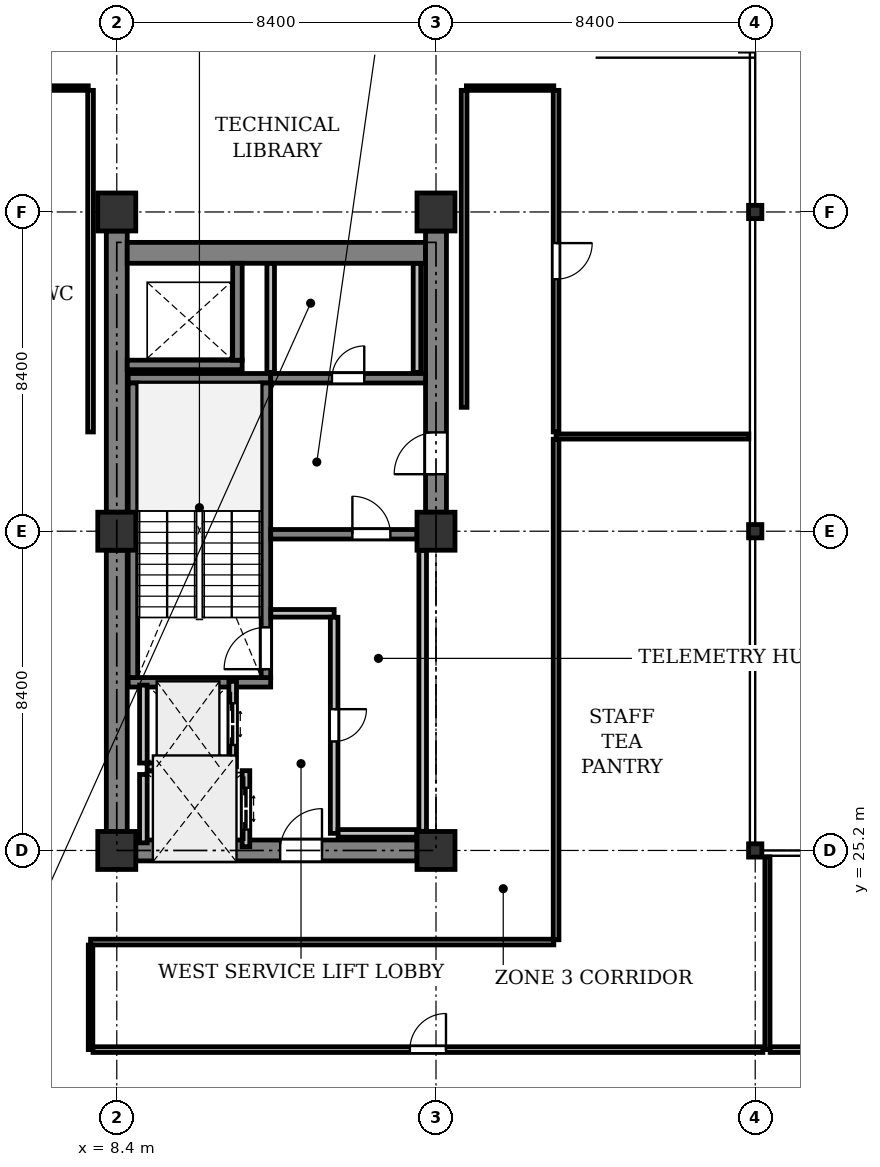
"""IFC4 building model, lengths in metres.
Left out: names, types, materials, properties, quantities, classifications, styles, units other than length and angle.
Written with IfcOpenShell. Run it as: python <this file> out.ifc"""

import sys

from ifc_helpers import new_model, si_unit, direction, frame, frame_2d, origin, origin_2d, place, context, subcontext, project, spatial, rectangle, i_section, extrude, element, fill, save


model = new_model("IFC4")
c1 = context("Model", 3, precision=1e-05, world=origin(), true_north=direction((0.0, 1.0)))
c2 = subcontext(c1, "Body", "Model", "MODEL_VIEW")
j1 = project(units=[si_unit("LENGTHUNIT", "METRE"), si_unit("PLANEANGLEUNIT", "RADIAN")], contexts=[c1])
p1 = place(None, origin())
s1 = spatial("IfcSite", under=j1, at=p1, CompositionType="ELEMENT")
p2 = place(p1, origin())
s2 = spatial("IfcBuilding", under=s1, at=p2, CompositionType="ELEMENT")
p3 = place(p2, frame((0.0, 0.0, 196.0)))
s3 = spatial("IfcBuildingStorey", under=s2, at=p3, CompositionType="ELEMENT", Elevation=196.0)
for number, where, z_axis, x_axis in (
    (1, (8.4, 25.2, 0.0), (0.0, 0.0, 1.0), (1.0, 0.0, 0.0)),
    (2, (8.4, 33.6, 0.0), (0.0, 0.0, 1.0), (1.0, 0.0, 0.0)),
    (3, (8.4, 42.0, 0.0), (0.0, 0.0, 1.0), (1.0, 0.0, 0.0)),
    (4, (16.8, 25.2, 0.0), (0.0, 0.0, 1.0), (1.0, 0.0, 0.0)),
    (5, (16.8, 33.6, 0.0), (0.0, 0.0, 1.0), (1.0, 0.0, 0.0)),
    (6, (16.8, 42.0, 0.0), (0.0, 0.0, 1.0), (1.0, 0.0, 0.0)),
):
    element("IfcColumn", number, at=place(p3, frame(where, z_axis=z_axis, x_axis=x_axis)), inside=s3, PredefinedType="COLUMN", context=c2, shape_type="SweptSolid", body=[
        extrude(rectangle(XDim=1.0, YDim=1.0, at=origin_2d()), origin(), (0.0, 0.0, 1.0), 4.1),
    ])
for number, where, z_axis, x_axis in (
    (7, (25.2, 25.2, 0.0), (0.0, 0.0, 1.0), (1.0, 0.0, 0.0)),
    (8, (25.2, 33.6, 0.0), (0.0, 0.0, 1.0), (1.0, 0.0, 0.0)),
    (9, (25.2, 42.0, 0.0), (0.0, 0.0, 1.0), (1.0, 0.0, 0.0)),
):
    element("IfcColumn", number, at=place(p3, frame(where, z_axis=z_axis, x_axis=x_axis)), inside=s3, PredefinedType="COLUMN", context=c2, shape_type="SweptSolid", body=[
        extrude(i_section(OverallWidth=0.35, OverallDepth=0.35, WebThickness=0.02, FlangeThickness=0.032, at=origin_2d()), origin(), (0.0, 0.0, 1.0), 4.1),
    ])
p4 = place(p3, frame((8.4, 25.7, 0.0), z_axis=(0.0, 0.0, 1.0), x_axis=(0.0, 1.0, 0.0)))
e10 = element("IfcWall", 10, at=p4, inside=s3, PredefinedType="SHEAR", context=c2, shape_type="SweptSolid", body=[
    extrude(rectangle(XDim=7.4, YDim=0.55, at=frame_2d((3.7, 0.0))), origin(), (0.0, 0.0, 1.0), 3.825),
])
p5 = place(p3, frame((8.4, 34.1, 0.0), z_axis=(0.0, 0.0, 1.0), x_axis=(0.0, 1.0, 0.0)))
e11 = element("IfcWall", 11, at=p5, inside=s3, PredefinedType="SHEAR", context=c2, shape_type="SweptSolid", body=[
    extrude(rectangle(XDim=7.4, YDim=0.55, at=frame_2d((3.7, 0.0))), origin(), (0.0, 0.0, 1.0), 3.825),
])
p6 = place(p3, frame((8.675, 40.925, 0.0), z_axis=(0.0, 0.0, 1.0), x_axis=(1.0, 0.0, 0.0)))
e12 = element("IfcWall", 12, at=p6, inside=s3, PredefinedType="SHEAR", context=c2, shape_type="SweptSolid", body=[
    extrude(rectangle(XDim=7.85, YDim=0.55, at=frame_2d((3.925, 0.0))), origin(), (0.0, 0.0, 1.0), 3.825),
])
p7 = place(p3, frame((16.8, 34.1, 0.0), z_axis=(0.0, 0.0, 1.0), x_axis=(0.0, 1.0, 0.0)))
e13 = element("IfcWall", 13, at=p7, inside=s3, PredefinedType="SHEAR", context=c2, shape_type="SweptSolid", body=[
    extrude(rectangle(XDim=7.4, YDim=0.55, at=frame_2d((3.7, 0.0))), origin(), (0.0, 0.0, 1.0), 3.825),
])
p8 = place(p7, frame((1.0, 0.0, 0.0)))
e14 = element("IfcOpeningElement", 14, at=p8, cuts=e13, PredefinedType="OPENING", context=c2, shape_type="SweptSolid", body=[
    extrude(rectangle(XDim=1.1, YDim=2.15, at=frame_2d((0.55, 1.075))), frame((0.0, 0.285, 0.0), z_axis=(0.0, -1.0, 0.0), x_axis=(1.0, 0.0, 0.0)), (0.0, 0.0, 1.0), 0.57),
])
p9 = place(p3, frame((8.9, 25.2, 0.0), z_axis=(0.0, 0.0, 1.0), x_axis=(1.0, 0.0, 0.0)))
e15 = element("IfcWall", 15, at=p9, inside=s3, PredefinedType="SHEAR", context=c2, shape_type="SweptSolid", body=[
    extrude(rectangle(XDim=7.4, YDim=0.55, at=frame_2d((3.7, 0.0))), origin(), (0.0, 0.0, 1.0), 3.825),
])
p10 = place(p9, frame((3.8, 0.0, 0.0)))
e16 = element("IfcOpeningElement", 16, at=p10, cuts=e15, PredefinedType="OPENING", context=c2, shape_type="SweptSolid", body=[
    extrude(rectangle(XDim=1.1, YDim=2.15, at=frame_2d((0.55, 1.075))), frame((0.0, 0.285, 0.0), z_axis=(0.0, -1.0, 0.0), x_axis=(1.0, 0.0, 0.0)), (0.0, 0.0, 1.0), 0.57),
])
for number, where, z_axis, x_axis in (
    (17, (12.45, 29.625, 0.0), (0.0, 0.0, 1.0), (-1.0, 0.0, 0.0)),
    (18, (12.45, 37.625, 0.0), (0.0, 0.0, 1.0), (-1.0, 0.0, 0.0)),
):
    element("IfcWall", number, at=place(p3, frame(where, z_axis=z_axis, x_axis=x_axis)), inside=s3, PredefinedType="SHEAR", context=c2, shape_type="SweptSolid", body=[
        extrude(rectangle(XDim=3.75, YDim=0.25, at=frame_2d((1.875, 0.0))), origin(), (0.0, 0.0, 1.0), 3.825),
    ])
p11 = place(p3, frame((12.325, 29.75, 0.0), z_axis=(0.0, 0.0, 1.0), x_axis=(0.0, 1.0, 0.0)))
e19 = element("IfcWall", 19, at=p11, inside=s3, PredefinedType="SHEAR", context=c2, shape_type="SweptSolid", body=[
    extrude(rectangle(XDim=7.75, YDim=0.25, at=frame_2d((3.875, 0.0))), origin(), (0.0, 0.0, 1.0), 3.825),
])
p12 = place(p11, frame((0.22, 0.0, 0.0)))
e20 = element("IfcOpeningElement", 20, at=p12, cuts=e19, PredefinedType="OPENING", context=c2, shape_type="SweptSolid", body=[
    extrude(rectangle(XDim=1.1, YDim=2.15, at=frame_2d((0.55, 1.075))), frame((0.0, 0.135, 0.0), z_axis=(0.0, -1.0, 0.0), x_axis=(1.0, 0.0, 0.0)), (0.0, 0.0, 1.0), 0.27),
])
p13 = place(p3, frame((8.825, 29.75, 0.0), z_axis=(0.0, 0.0, 1.0), x_axis=(0.0, 1.0, 0.0)))
e21 = element("IfcWall", 21, at=p13, inside=s3, PredefinedType="SHEAR", context=c2, shape_type="SweptSolid", body=[
    extrude(rectangle(XDim=7.75, YDim=0.25, at=frame_2d((3.875, 0.0))), origin(), (0.0, 0.0, 1.0), 3.825),
])
p14 = place(p3, frame((8.675, 37.975, 0.0), z_axis=(0.0, 0.0, 1.0), x_axis=(1.0, 0.0, 0.0)))
e22 = element("IfcWall", 22, at=p14, inside=s3, PredefinedType="SHEAR", context=c2, shape_type="SweptSolid", body=[
    extrude(rectangle(XDim=3.025, YDim=0.25, at=frame_2d((1.512, 0.0))), origin(), (0.0, 0.0, 1.0), 3.825),
])
p15 = place(p3, frame((11.575, 38.1, 0.0), z_axis=(0.0, 0.0, 1.0), x_axis=(0.0, 1.0, 0.0)))
e23 = element("IfcWall", 23, at=p15, inside=s3, PredefinedType="SHEAR", context=c2, shape_type="SweptSolid", body=[
    extrude(rectangle(XDim=2.55, YDim=0.25, at=frame_2d((1.275, 0.0))), origin(), (0.0, 0.0, 1.0), 3.825),
])
p16 = place(p3, frame((12.45, 33.52, 0.0), z_axis=(0.0, 0.0, 1.0), x_axis=(1.0, 0.0, 0.0)))
e24 = element("IfcWall", 24, at=p16, inside=s3, PredefinedType="SHEAR", context=c2, shape_type="SweptSolid", body=[
    extrude(rectangle(XDim=3.85, YDim=0.25, at=frame_2d((1.925, 0.0))), origin(), (0.0, 0.0, 1.0), 3.825),
])
p17 = place(p16, frame((2.15, 0.0, 0.0)))
e25 = element("IfcOpeningElement", 25, at=p17, cuts=e24, PredefinedType="OPENING", context=c2, shape_type="SweptSolid", body=[
    extrude(rectangle(XDim=1.0, YDim=2.15, at=frame_2d((0.5, 1.075))), frame((0.0, 0.135, 0.0), z_axis=(0.0, -1.0, 0.0), x_axis=(1.0, 0.0, 0.0)), (0.0, 0.0, 1.0), 0.27),
])
p18 = place(p3, frame((12.45, 37.625, 0.0), z_axis=(0.0, 0.0, 1.0), x_axis=(1.0, 0.0, 0.0)))
e26 = element("IfcWall", 26, at=p18, inside=s3, PredefinedType="SHEAR", context=c2, shape_type="SweptSolid", body=[
    extrude(rectangle(XDim=4.075, YDim=0.25, at=frame_2d((2.038, 0.0))), origin(), (0.0, 0.0, 1.0), 3.825),
])
p19 = place(p18, frame((1.613, 0.0, 0.0)))
e27 = element("IfcOpeningElement", 27, at=p19, cuts=e26, PredefinedType="OPENING", context=c2, shape_type="SweptSolid", body=[
    extrude(rectangle(XDim=0.85, YDim=2.15, at=frame_2d((0.425, 1.075))), frame((0.0, 0.135, 0.0), z_axis=(0.0, -1.0, 0.0), x_axis=(1.0, 0.0, 0.0)), (0.0, 0.0, 1.0), 0.27),
])
p20 = place(p3, frame((11.45, 27.4, 0.0), z_axis=(0.0, 0.0, 1.0), x_axis=(0.0, 1.0, 0.0)))
e28 = element("IfcWall", 28, at=p20, inside=s3, PredefinedType="PARTITIONING", context=c2, shape_type="SweptSolid", body=[
    extrude(rectangle(XDim=2.25, YDim=0.2, at=frame_2d((1.125, 0.0))), origin(), (0.0, 0.0, 1.0), 3.825),
])
p21 = place(p20, frame((0.575, 0.0, 0.0)))
e29 = element("IfcOpeningElement", 29, at=p21, cuts=e28, PredefinedType="OPENING", context=c2, shape_type="SweptSolid", body=[
    extrude(rectangle(XDim=1.1, YDim=2.2, at=frame_2d((0.55, 1.1))), frame((0.0, 0.11, 0.0), z_axis=(0.0, -1.0, 0.0), x_axis=(1.0, 0.0, 0.0)), (0.0, 0.0, 1.0), 0.22),
])
p22 = place(p3, frame((9.1, 27.5, 0.0), z_axis=(0.0, 0.0, 1.0), x_axis=(0.0, 1.0, 0.0)))
e30 = element("IfcWall", 30, at=p22, inside=s3, PredefinedType="PARTITIONING", context=c2, shape_type="SweptSolid", body=[
    extrude(rectangle(XDim=2.05, YDim=0.2, at=frame_2d((1.025, 0.0))), origin(), (0.0, 0.0, 1.0), 3.825),
])
p23 = place(p3, frame((9.2, 27.4, 0.0), z_axis=(0.0, 0.0, 1.0), x_axis=(1.0, 0.0, 0.0)))
e31 = element("IfcWall", 31, at=p23, inside=s3, PredefinedType="PARTITIONING", context=c2, shape_type="SweptSolid", body=[
    extrude(rectangle(XDim=2.15, YDim=0.2, at=frame_2d((1.075, 0.0))), origin(), (0.0, 0.0, 1.0), 3.825),
])
p24 = place(p3, frame((11.8, 25.3, 0.0), z_axis=(0.0, 0.0, 1.0), x_axis=(0.0, 1.0, 0.0)))
e32 = element("IfcWall", 32, at=p24, inside=s3, PredefinedType="PARTITIONING", context=c2, shape_type="SweptSolid", body=[
    extrude(rectangle(XDim=2.0, YDim=0.2, at=frame_2d((1.0, 0.0))), origin(), (0.0, 0.0, 1.0), 3.825),
])
p25 = place(p24, frame((0.45, 0.0, 0.0)))
e33 = element("IfcOpeningElement", 33, at=p25, cuts=e32, PredefinedType="OPENING", context=c2, shape_type="SweptSolid", body=[
    extrude(rectangle(XDim=1.1, YDim=2.2, at=frame_2d((0.55, 1.1))), frame((0.0, 0.11, 0.0), z_axis=(0.0, -1.0, 0.0), x_axis=(1.0, 0.0, 0.0)), (0.0, 0.0, 1.0), 0.22),
])
p26 = place(p3, frame((9.1, 25.4, 0.0), z_axis=(0.0, 0.0, 1.0), x_axis=(0.0, 1.0, 0.0)))
e34 = element("IfcWall", 34, at=p26, inside=s3, PredefinedType="PARTITIONING", context=c2, shape_type="SweptSolid", body=[
    extrude(rectangle(XDim=1.8, YDim=0.2, at=frame_2d((0.9, 0.0))), origin(), (0.0, 0.0, 1.0), 3.825),
])
p27 = place(p3, frame((16.45, 25.705, 0.0), z_axis=(0.0, 0.0, 1.0), x_axis=(0.0, 1.0, 0.0)))
e35 = element("IfcWall", 35, at=p27, inside=s3, PredefinedType="PARTITIONING", context=c2, shape_type="SweptSolid", body=[
    extrude(rectangle(XDim=7.39, YDim=0.2, at=frame_2d((3.695, 0.0))), origin(), (0.0, 0.0, 1.0), 3.825),
])
p28 = place(p3, frame((12.454, 31.44, 0.0), z_axis=(0.0, 0.0, 1.0), x_axis=(1.0, 0.0, 0.0)))
e36 = element("IfcWall", 36, at=p28, inside=s3, PredefinedType="PARTITIONING", context=c2, shape_type="SweptSolid", body=[
    extrude(rectangle(XDim=1.666, YDim=0.2, at=frame_2d((0.833, 0.0))), origin(), (0.0, 0.0, 1.0), 3.825),
])
p29 = place(p3, frame((14.12, 31.336, 0.0), z_axis=(0.0, 0.0, 1.0), x_axis=(0.0, -1.0, 0.0)))
e37 = element("IfcWall", 37, at=p29, inside=s3, PredefinedType="PARTITIONING", context=c2, shape_type="SweptSolid", body=[
    extrude(rectangle(XDim=5.686, YDim=0.2, at=frame_2d((2.843, 0.0))), origin(), (0.0, 0.0, 1.0), 3.825),
])
p30 = place(p29, frame((2.418, 0.0, 0.0)))
e38 = element("IfcOpeningElement", 38, at=p30, cuts=e37, PredefinedType="OPENING", context=c2, shape_type="SweptSolid", body=[
    extrude(rectangle(XDim=0.85, YDim=2.15, at=frame_2d((0.425, 1.075))), frame((0.0, 0.11, 0.0), z_axis=(0.0, -1.0, 0.0), x_axis=(1.0, 0.0, 0.0)), (0.0, 0.0, 1.0), 0.22),
])
p31 = place(p3, frame((14.224, 25.65, 0.0), z_axis=(0.0, 0.0, 1.0), x_axis=(1.0, 0.0, 0.0)))
e39 = element("IfcWall", 39, at=p31, inside=s3, PredefinedType="PARTITIONING", context=c2, shape_type="SweptSolid", body=[
    extrude(rectangle(XDim=2.071, YDim=0.2, at=frame_2d((1.035, 0.0))), origin(), (0.0, 0.0, 1.0), 3.825),
])
for number, where, z_axis, x_axis in (
    (40, (16.3, 37.78, 0.0), (0.0, 0.0, 1.0), (0.0, 1.0, 0.0)),
    (41, (12.45, 40.646, 0.0), (0.0, 0.0, 1.0), (0.0, -1.0, 0.0)),
):
    element("IfcWall", number, at=place(p3, frame(where, z_axis=z_axis, x_axis=x_axis)), inside=s3, PredefinedType="PARTITIONING", context=c2, shape_type="SweptSolid", body=[
        extrude(rectangle(XDim=2.866, YDim=0.2, at=frame_2d((1.433, 0.0))), origin(), (0.0, 0.0, 1.0), 2.875),
    ])
p32 = place(p3, frame((25.521, 25.031, 0.0), z_axis=(0.0, 0.0, 1.0), x_axis=(0.0, -1.0, 0.0)))
e42 = element("IfcWall", 42, at=p32, inside=s3, PredefinedType="PARTITIONING", context=c2, shape_type="SweptSolid", body=[
    extrude(rectangle(XDim=5.071, YDim=0.135, at=frame_2d((2.536, 0.0))), origin(), (0.0, 0.0, 1.0), 3.825),
])
p33 = place(p3, frame((25.593, 19.96, 0.0), z_axis=(0.0, 0.0, 1.0), x_axis=(1.0, 0.0, 0.0)))
e43 = element("IfcWall", 43, at=p33, inside=s3, PredefinedType="PARTITIONING", context=c2, shape_type="SweptSolid", body=[
    extrude(rectangle(XDim=11.057, YDim=0.15, at=frame_2d((5.528, 0.0))), origin(), (0.0, 0.0, 1.0), 3.371),
])
p34 = place(p33, frame((5.053, 0.0, 0.0)))
e44 = element("IfcOpeningElement", 44, at=p34, cuts=e43, PredefinedType="OPENING", context=c2, shape_type="SweptSolid", body=[
    extrude(rectangle(XDim=0.95, YDim=2.15, at=frame_2d((0.475, 1.075))), frame((0.0, 0.085, 0.0), z_axis=(0.0, -1.0, 0.0), x_axis=(1.0, 0.0, 0.0)), (0.0, 0.0, 1.0), 0.17),
])
p35 = place(p3, frame((19.9, 22.79, 0.0), z_axis=(0.0, 0.0, 1.0), x_axis=(-1.0, 0.0, 0.0)))
e45 = element("IfcWall", 45, at=p35, inside=s3, PredefinedType="PARTITIONING", context=c2, shape_type="SweptSolid", body=[
    extrude(rectangle(XDim=12.19, YDim=0.15, at=frame_2d((6.095, 0.0))), origin(), (0.0, 0.0, 1.0), 3.371),
])
p36 = place(p3, frame((7.71, 22.711, 0.0), z_axis=(0.0, 0.0, 1.0), x_axis=(0.0, -1.0, 0.0)))
e46 = element("IfcWall", 46, at=p36, inside=s3, PredefinedType="PARTITIONING", context=c2, shape_type="SweptSolid", body=[
    extrude(rectangle(XDim=2.751, YDim=0.12, at=frame_2d((1.375, 0.0))), origin(), (0.0, 0.0, 1.0), 3.825),
])
p37 = place(p3, frame((7.774, 19.96, 0.0), z_axis=(0.0, 0.0, 1.0), x_axis=(1.0, 0.0, 0.0)))
e47 = element("IfcWall", 47, at=p37, inside=s3, PredefinedType="PARTITIONING", context=c2, shape_type="SweptSolid", body=[
    extrude(rectangle(XDim=17.628, YDim=0.15, at=frame_2d((8.814, 0.0))), origin(), (0.0, 0.0, 1.0), 3.371),
])
p38 = place(p37, frame((8.339, 0.0, 0.0)))
e48 = element("IfcOpeningElement", 48, at=p38, cuts=e47, PredefinedType="OPENING", context=c2, shape_type="SweptSolid", body=[
    extrude(rectangle(XDim=0.95, YDim=2.15, at=frame_2d((0.475, 1.075))), frame((0.0, 0.085, 0.0), z_axis=(0.0, -1.0, 0.0), x_axis=(1.0, 0.0, 0.0)), (0.0, 0.0, 1.0), 0.17),
])
p39 = place(p3, frame((25.031, 36.092, 0.0), z_axis=(0.0, 0.0, 1.0), x_axis=(-1.0, 0.0, 0.0)))
e49 = element("IfcWall", 49, at=p39, inside=s3, PredefinedType="PARTITIONING", context=c2, shape_type="SweptSolid", body=[
    extrude(rectangle(XDim=5.071, YDim=0.135, at=frame_2d((2.536, 0.0))), origin(), (0.0, 0.0, 1.0), 3.518),
])
p40 = place(p3, frame((19.96, 36.021, 0.0), z_axis=(0.0, 0.0, 1.0), x_axis=(0.0, -1.0, 0.0)))
e50 = element("IfcWall", 50, at=p40, inside=s3, PredefinedType="PARTITIONING", context=c2, shape_type="SweptSolid", body=[
    extrude(rectangle(XDim=13.17, YDim=0.15, at=frame_2d((6.585, 0.0))), origin(), (0.0, 0.0, 1.0), 3.365),
])
p41 = place(p3, frame((19.96, 45.2, 0.0), z_axis=(0.0, 0.0, 1.0), x_axis=(0.0, -1.0, 0.0)))
e51 = element("IfcWall", 51, at=p41, inside=s3, PredefinedType="PARTITIONING", context=c2, shape_type="SweptSolid", body=[
    extrude(rectangle(XDim=8.988, YDim=0.15, at=frame_2d((4.494, 0.0))), origin(), (0.0, 0.0, 1.0), 3.365),
])
p42 = place(p41, frame((4.019, 0.0, 0.0)))
e52 = element("IfcOpeningElement", 52, at=p42, cuts=e51, PredefinedType="OPENING", context=c2, shape_type="SweptSolid", body=[
    extrude(rectangle(XDim=0.95, YDim=2.15, at=frame_2d((0.475, 1.075))), frame((0.0, 0.085, 0.0), z_axis=(0.0, -1.0, 0.0), x_axis=(1.0, 0.0, 0.0)), (0.0, 0.0, 1.0), 0.17),
])
p43 = place(p3, frame((5.4, 45.26, 0.0), z_axis=(0.0, 0.0, 1.0), x_axis=(1.0, 0.0, 0.0)))
e53 = element("IfcWall", 53, at=p43, inside=s3, PredefinedType="PARTITIONING", context=c2, shape_type="SweptSolid", body=[
    extrude(rectangle(XDim=2.25, YDim=0.12, at=frame_2d((1.125, 0.0))), origin(), (0.0, 0.0, 1.0), 3.825),
])
p44 = place(p3, frame((7.71, 45.2, 0.0), z_axis=(0.0, 0.0, 1.0), x_axis=(0.0, -1.0, 0.0)))
e54 = element("IfcWall", 54, at=p44, inside=s3, PredefinedType="PARTITIONING", context=c2, shape_type="SweptSolid", body=[
    extrude(rectangle(XDim=8.988, YDim=0.15, at=frame_2d((4.494, 0.0))), origin(), (0.0, 0.0, 1.0), 3.365),
])
p45 = place(p3, frame((17.54, 36.86, 0.0), z_axis=(0.0, 0.0, 1.0), x_axis=(0.0, 1.0, 0.0)))
e55 = element("IfcWall", 55, at=p45, inside=s3, PredefinedType="PARTITIONING", context=c2, shape_type="SweptSolid", body=[
    extrude(rectangle(XDim=8.34, YDim=0.15, at=frame_2d((4.17, 0.0))), origin(), (0.0, 0.0, 1.0), 3.365),
])
p46 = place(p3, frame((17.6, 45.26, 0.0), z_axis=(0.0, 0.0, 1.0), x_axis=(1.0, 0.0, 0.0)))
e56 = element("IfcWall", 56, at=p46, inside=s3, PredefinedType="PARTITIONING", context=c2, shape_type="SweptSolid", body=[
    extrude(rectangle(XDim=2.3, YDim=0.12, at=frame_2d((1.15, 0.0))), origin(), (0.0, 0.0, 1.0), 3.825),
])
p47 = place(p8, origin())
e57 = element("IfcDoor", 57, at=p47, inside=s3, OperationType="SINGLE_SWING_LEFT", PredefinedType="DOOR", context=c2, shape_type="SweptSolid", body=[
    extrude(rectangle(XDim=1.1, YDim=2.15, at=frame_2d((0.55, 1.075))), frame((0.0, 0.025, 0.0), z_axis=(0.0, -1.0, 0.0), x_axis=(1.0, 0.0, 0.0)), (0.0, 0.0, 1.0), 0.05),
])
fill(e14, e57)
p48 = place(p10, origin())
e58 = element("IfcDoor", 58, at=p48, inside=s3, OperationType="SINGLE_SWING_RIGHT", PredefinedType="DOOR", context=c2, shape_type="SweptSolid", body=[
    extrude(rectangle(XDim=1.1, YDim=2.15, at=frame_2d((0.55, 1.075))), frame((0.0, 0.025, 0.0), z_axis=(0.0, -1.0, 0.0), x_axis=(1.0, 0.0, 0.0)), (0.0, 0.0, 1.0), 0.05),
])
fill(e16, e58)
p49 = place(p12, origin())
e59 = element("IfcDoor", 59, at=p49, inside=s3, OperationType="SINGLE_SWING_LEFT", PredefinedType="DOOR", context=c2, shape_type="SweptSolid", body=[
    extrude(rectangle(XDim=1.1, YDim=2.15, at=frame_2d((0.55, 1.075))), frame((0.0, 0.025, 0.0), z_axis=(0.0, -1.0, 0.0), x_axis=(1.0, 0.0, 0.0)), (0.0, 0.0, 1.0), 0.05),
])
fill(e20, e59)
p50 = place(p17, origin())
e60 = element("IfcDoor", 60, at=p50, inside=s3, OperationType="SINGLE_SWING_LEFT", PredefinedType="DOOR", context=c2, shape_type="SweptSolid", body=[
    extrude(rectangle(XDim=1.0, YDim=2.15, at=frame_2d((0.5, 1.075))), frame((0.0, 0.025, 0.0), z_axis=(0.0, -1.0, 0.0), x_axis=(1.0, 0.0, 0.0)), (0.0, 0.0, 1.0), 0.05),
])
fill(e25, e60)
p51 = place(p21, origin())
e61 = element("IfcDoor", 61, at=p51, inside=s3, OperationType="DOUBLE_DOOR_SLIDING", PredefinedType="DOOR", context=c2, shape_type="SweptSolid", body=[
    extrude(rectangle(XDim=1.1, YDim=2.2, at=frame_2d((0.55, 1.1))), frame((0.0, 0.025, 0.0), z_axis=(0.0, -1.0, 0.0), x_axis=(1.0, 0.0, 0.0)), (0.0, 0.0, 1.0), 0.05),
])
fill(e29, e61)
p52 = place(p25, origin())
e62 = element("IfcDoor", 62, at=p52, inside=s3, OperationType="DOUBLE_DOOR_SLIDING", PredefinedType="DOOR", context=c2, shape_type="SweptSolid", body=[
    extrude(rectangle(XDim=1.1, YDim=2.2, at=frame_2d((0.55, 1.1))), frame((0.0, 0.025, 0.0), z_axis=(0.0, -1.0, 0.0), x_axis=(1.0, 0.0, 0.0)), (0.0, 0.0, 1.0), 0.05),
])
fill(e33, e62)
p53 = place(p30, origin())
e63 = element("IfcDoor", 63, at=p53, inside=s3, OperationType="SINGLE_SWING_LEFT", PredefinedType="DOOR", context=c2, shape_type="SweptSolid", body=[
    extrude(rectangle(XDim=0.85, YDim=2.15, at=frame_2d((0.425, 1.075))), frame((0.0, 0.025, 0.0), z_axis=(0.0, -1.0, 0.0), x_axis=(1.0, 0.0, 0.0)), (0.0, 0.0, 1.0), 0.05),
])
fill(e38, e63)
p54 = place(p19, origin())
e64 = element("IfcDoor", 64, at=p54, inside=s3, OperationType="SINGLE_SWING_RIGHT", PredefinedType="DOOR", context=c2, shape_type="SweptSolid", body=[
    extrude(rectangle(XDim=0.85, YDim=2.15, at=frame_2d((0.425, 1.075))), frame((0.0, 0.025, 0.0), z_axis=(0.0, -1.0, 0.0), x_axis=(1.0, 0.0, 0.0)), (0.0, 0.0, 1.0), 0.05),
])
fill(e27, e64)
p55 = place(p38, origin())
e65 = element("IfcDoor", 65, at=p55, inside=s3, OperationType="SINGLE_SWING_RIGHT", PredefinedType="DOOR", context=c2, shape_type="SweptSolid", body=[
    extrude(rectangle(XDim=0.95, YDim=2.15, at=frame_2d((0.475, 1.075))), frame((0.0, 0.025, 0.0), z_axis=(0.0, -1.0, 0.0), x_axis=(1.0, 0.0, 0.0)), (0.0, 0.0, 1.0), 0.05),
])
fill(e48, e65)
p56 = place(p42, origin())
e66 = element("IfcDoor", 66, at=p56, inside=s3, OperationType="SINGLE_SWING_LEFT", PredefinedType="DOOR", context=c2, shape_type="SweptSolid", body=[
    extrude(rectangle(XDim=0.95, YDim=2.15, at=frame_2d((0.475, 1.075))), frame((0.0, 0.025, 0.0), z_axis=(0.0, -1.0, 0.0), x_axis=(1.0, 0.0, 0.0)), (0.0, 0.0, 1.0), 0.05),
])
fill(e52, e66)
save(model, sys.argv[1])
